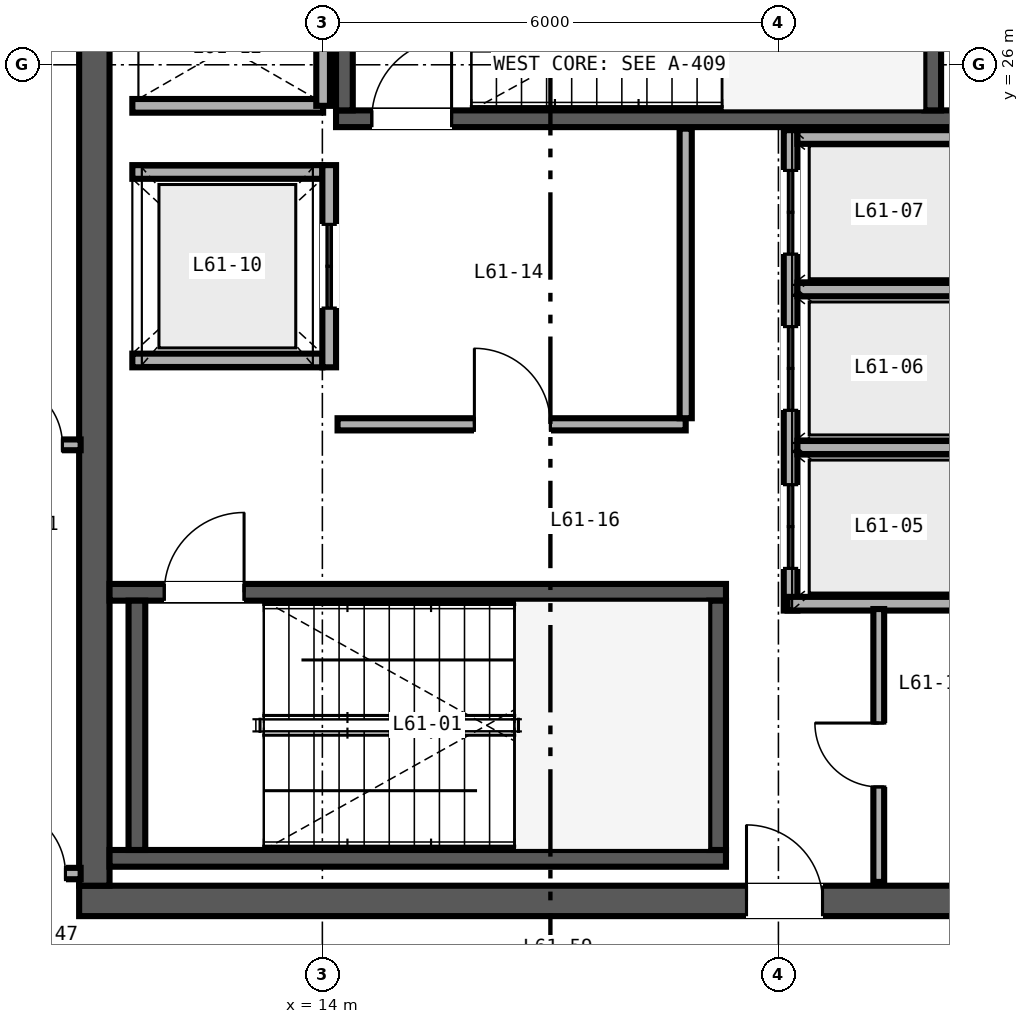
"""IFC4 building model, lengths in metres.
Left out: names, types, materials, properties, quantities, classifications, styles, units other than length and angle.
Written with IfcOpenShell. Run it as: python <this file> out.ifc"""

import sys

from ifc_helpers import new_model, si_unit, direction, frame, frame_2d, origin, place, context, subcontext, project, spatial, rectangle, extrude, source, transform, mapped, element, fill, save


model = new_model("IFC4")
c1 = context("Model", 3, precision=1e-05, world=origin(), true_north=direction((0.0, 1.0)))
c2 = subcontext(c1, "Body", "Model", "MODEL_VIEW")
j1 = project(units=[si_unit("LENGTHUNIT", "METRE"), si_unit("PLANEANGLEUNIT", "RADIAN")], contexts=[c1])
p1 = place(None, origin())
s1 = spatial("IfcSite", under=j1, at=p1, CompositionType="ELEMENT")
p2 = place(p1, origin())
s2 = spatial("IfcBuilding", under=s1, at=p2, CompositionType="ELEMENT")
p3 = place(p2, frame((0.0, 0.0, 243.6)))
s3 = spatial("IfcBuildingStorey", under=s2, at=p3, CompositionType="ELEMENT", Elevation=243.6)
p4 = place(p3, frame((10.8, 15.0, 0.0), z_axis=(0.0, 0.0, 1.0), x_axis=(1.0, 0.0, 0.0)))
e1 = element("IfcWall", 1, at=p4, inside=s3, PredefinedType="SHEAR", context=c2, shape_type="SweptSolid", body=[
    extrude(rectangle(XDim=12.4, YDim=0.4, at=frame_2d((6.2, 0.0))), origin(), (0.0, 0.0, 1.0), 3.28),
])
p5 = place(p4, frame((8.78, 0.0, 0.0)))
e2 = element("IfcOpeningElement", 2, at=p5, cuts=e1, PredefinedType="OPENING", context=c2, shape_type="SweptSolid", body=[
    extrude(rectangle(XDim=1.0, YDim=2.15, at=frame_2d((0.5, 1.075))), frame((0.0, 0.21, 0.0), z_axis=(0.0, -1.0, 0.0), x_axis=(1.0, 0.0, 0.0)), (0.0, 0.0, 1.0), 0.42),
])
p6 = place(p3, frame((11.0, 15.2, 0.0), z_axis=(0.0, 0.0, 1.0), x_axis=(0.0, 1.0, 0.0)))
e3 = element("IfcWall", 3, at=p6, inside=s3, PredefinedType="SHEAR", context=c2, shape_type="SweptSolid", body=[
    extrude(rectangle(XDim=21.6, YDim=0.4, at=frame_2d((10.8, 0.0))), origin(), (0.0, 0.0, 1.0), 3.28),
])
p7 = place(p3, frame((11.2, 15.56, 0.0), z_axis=(0.0, 0.0, 1.0), x_axis=(1.0, 0.0, 0.0)))
e4 = element("IfcWall", 4, at=p7, inside=s3, PredefinedType="SHEAR", context=c2, shape_type="SweptSolid", body=[
    extrude(rectangle(XDim=8.11, YDim=0.22, at=frame_2d((4.055, 0.0))), origin(), (0.0, 0.0, 1.0), 3.4),
])
p8 = place(p3, frame((11.2, 19.06, 0.0), z_axis=(0.0, 0.0, 1.0), x_axis=(1.0, 0.0, 0.0)))
e5 = element("IfcWall", 5, at=p8, inside=s3, PredefinedType="SHEAR", context=c2, shape_type="SweptSolid", body=[
    extrude(rectangle(XDim=8.11, YDim=0.22, at=frame_2d((4.055, 0.0))), origin(), (0.0, 0.0, 1.0), 3.4),
])
p9 = place(p8, frame((0.72, 0.0, 0.0)))
e6 = element("IfcOpeningElement", 6, at=p9, cuts=e5, PredefinedType="OPENING", context=c2, shape_type="SweptSolid", body=[
    extrude(rectangle(XDim=1.05, YDim=2.15, at=frame_2d((0.525, 1.075))), frame((0.0, 0.12, 0.0), z_axis=(0.0, -1.0, 0.0), x_axis=(1.0, 0.0, 0.0)), (0.0, 0.0, 1.0), 0.24),
])
for number, where, z_axis, x_axis in (
    (7, (11.56, 15.67, 0.0), (0.0, 0.0, 1.0), (0.0, 1.0, 0.0)),
    (8, (19.2, 15.67, 0.0), (0.0, 0.0, 1.0), (0.0, 1.0, 0.0)),
):
    element("IfcWall", number, at=place(p3, frame(where, z_axis=z_axis, x_axis=x_axis)), inside=s3, PredefinedType="SHEAR", context=c2, shape_type="SweptSolid", body=[
        extrude(rectangle(XDim=3.28, YDim=0.22, at=frame_2d((1.64, 0.0))), origin(), (0.0, 0.0, 1.0), 3.4),
    ])
p10 = place(p3, frame((14.18, 25.29, 0.0), z_axis=(0.0, 0.0, 1.0), x_axis=(1.0, 0.0, 0.0)))
e9 = element("IfcWall", 9, at=p10, inside=s3, PredefinedType="SHEAR", context=c2, shape_type="SweptSolid", body=[
    extrude(rectangle(XDim=8.62, YDim=0.22, at=frame_2d((4.31, 0.0))), origin(), (0.0, 0.0, 1.0), 3.4),
])
p11 = place(p10, frame((0.47, 0.0, 0.0)))
e10 = element("IfcOpeningElement", 10, at=p11, cuts=e9, PredefinedType="OPENING", context=c2, shape_type="SweptSolid", body=[
    extrude(rectangle(XDim=1.05, YDim=2.15, at=frame_2d((0.525, 1.075))), frame((0.0, 0.12, 0.0), z_axis=(0.0, -1.0, 0.0), x_axis=(1.0, 0.0, 0.0)), (0.0, 0.0, 1.0), 0.24),
])
for number, where, z_axis, x_axis in (
    (11, (14.29, 25.4, 0.0), (0.0, 0.0, 1.0), (0.0, 1.0, 0.0)),
    (12, (22.03, 25.4, 0.0), (0.0, 0.0, 1.0), (0.0, 1.0, 0.0)),
):
    element("IfcWall", number, at=place(p3, frame(where, z_axis=z_axis, x_axis=x_axis)), inside=s3, PredefinedType="SHEAR", context=c2, shape_type="SweptSolid", body=[
        extrude(rectangle(XDim=3.28, YDim=0.22, at=frame_2d((1.64, 0.0))), origin(), (0.0, 0.0, 1.0), 3.4),
    ])
p12 = place(p3, frame((20.16, 18.82, 0.0), z_axis=(0.0, 0.0, 1.0), x_axis=(0.0, 1.0, 0.0)))
e13 = element("IfcWall", 13, at=p12, inside=s3, PredefinedType="SOLIDWALL", context=c2, shape_type="SweptSolid", body=[
    extrude(rectangle(XDim=6.32, YDim=0.18, at=frame_2d((3.16, 0.0))), origin(), (0.0, 0.0, 1.0), 2.38),
])
p13 = place(p12, frame((0.555, 0.0, 0.0)))
e14 = element("IfcOpeningElement", 14, at=p13, cuts=e13, PredefinedType="OPENING", context=c2, shape_type="SweptSolid", body=[
    extrude(rectangle(XDim=1.1, YDim=2.2, at=frame_2d((0.55, 1.1))), frame((0.0, 0.1, 0.0), z_axis=(0.0, -1.0, 0.0), x_axis=(1.0, 0.0, 0.0)), (0.0, 0.0, 1.0), 0.2),
])
p14 = place(p12, frame((2.635, 0.0, 0.0)))
e15 = element("IfcOpeningElement", 15, at=p14, cuts=e13, PredefinedType="OPENING", context=c2, shape_type="SweptSolid", body=[
    extrude(rectangle(XDim=1.1, YDim=2.2, at=frame_2d((0.55, 1.1))), frame((0.0, 0.1, 0.0), z_axis=(0.0, -1.0, 0.0), x_axis=(1.0, 0.0, 0.0)), (0.0, 0.0, 1.0), 0.2),
])
p15 = place(p12, frame((4.69, 0.0, 0.0)))
e16 = element("IfcOpeningElement", 16, at=p15, cuts=e13, PredefinedType="OPENING", context=c2, shape_type="SweptSolid", body=[
    extrude(rectangle(XDim=1.1, YDim=2.2, at=frame_2d((0.55, 1.1))), frame((0.0, 0.1, 0.0), z_axis=(0.0, -1.0, 0.0), x_axis=(1.0, 0.0, 0.0)), (0.0, 0.0, 1.0), 0.2),
])
p16 = place(p3, frame((20.12, 18.91, 0.0), z_axis=(0.0, 0.0, 1.0), x_axis=(1.0, 0.0, 0.0)))
e17 = element("IfcWall", 17, at=p16, inside=s3, PredefinedType="SOLIDWALL", context=c2, shape_type="SweptSolid", body=[
    extrude(rectangle(XDim=2.63, YDim=0.18, at=frame_2d((1.315, 0.0))), origin(), (0.0, 0.0, 1.0), 3.28),
])
p17 = place(p3, frame((20.25, 25.05, 0.0), z_axis=(0.0, 0.0, 1.0), x_axis=(1.0, 0.0, 0.0)))
e18 = element("IfcWall", 18, at=p17, inside=s3, PredefinedType="SOLIDWALL", context=c2, shape_type="SweptSolid", body=[
    extrude(rectangle(XDim=2.36, YDim=0.18, at=frame_2d((1.18, 0.0))), origin(), (0.0, 0.0, 1.0), 3.28),
])
p18 = place(p3, frame((20.25, 20.965, 0.0), z_axis=(0.0, 0.0, 1.0), x_axis=(1.0, 0.0, 0.0)))
e19 = element("IfcWall", 19, at=p18, inside=s3, PredefinedType="SOLIDWALL", context=c2, shape_type="SweptSolid", body=[
    extrude(rectangle(XDim=2.36, YDim=0.18, at=frame_2d((1.18, 0.0))), origin(), (0.0, 0.0, 1.0), 2.38),
])
p19 = place(p3, frame((20.25, 23.045, 0.0), z_axis=(0.0, 0.0, 1.0), x_axis=(1.0, 0.0, 0.0)))
e20 = element("IfcWall", 20, at=p19, inside=s3, PredefinedType="SOLIDWALL", context=c2, shape_type="SweptSolid", body=[
    extrude(rectangle(XDim=2.36, YDim=0.18, at=frame_2d((1.18, 0.0))), origin(), (0.0, 0.0, 1.0), 3.28),
])
for number, where, z_axis, x_axis in (
    (21, (11.5, 22.11, 0.0), (0.0, 0.0, 1.0), (1.0, 0.0, 0.0)),
    (22, (11.5, 24.59, 0.0), (0.0, 0.0, 1.0), (1.0, 0.0, 0.0)),
):
    element("IfcWall", number, at=place(p3, frame(where, z_axis=z_axis, x_axis=x_axis)), inside=s3, PredefinedType="SOLIDWALL", context=c2, shape_type="SweptSolid", body=[
        extrude(rectangle(XDim=2.5, YDim=0.18, at=frame_2d((1.25, 0.0))), origin(), (0.0, 0.0, 1.0), 3.28),
    ])
p20 = place(p3, frame((14.09, 22.02, 0.0), z_axis=(0.0, 0.0, 1.0), x_axis=(0.0, 1.0, 0.0)))
e23 = element("IfcWall", 23, at=p20, inside=s3, PredefinedType="SOLIDWALL", context=c2, shape_type="SweptSolid", body=[
    extrude(rectangle(XDim=2.66, YDim=0.18, at=frame_2d((1.33, 0.0))), origin(), (0.0, 0.0, 1.0), 3.28),
])
p21 = place(p20, frame((0.78, 0.0, 0.0)))
e24 = element("IfcOpeningElement", 24, at=p21, cuts=e23, PredefinedType="OPENING", context=c2, shape_type="SweptSolid", body=[
    extrude(rectangle(XDim=1.1, YDim=2.2, at=frame_2d((0.55, 1.1))), frame((0.0, 0.1, 0.0), z_axis=(0.0, -1.0, 0.0), x_axis=(1.0, 0.0, 0.0)), (0.0, 0.0, 1.0), 0.2),
])
p22 = place(p3, frame((11.5, 25.46, 0.0), z_axis=(0.0, 0.0, 1.0), x_axis=(1.0, 0.0, 0.0)))
e25 = element("IfcWall", 25, at=p22, inside=s3, PredefinedType="SOLIDWALL", context=c2, shape_type="SweptSolid", body=[
    extrude(rectangle(XDim=2.51, YDim=0.18, at=frame_2d((1.255, 0.0))), origin(), (0.0, 0.0, 1.0), 3.28),
])
p23 = place(p3, frame((14.01, 25.46, 0.0), z_axis=(0.0, 0.0, 1.0), x_axis=(0.0, 1.0, 0.0)))
e26 = element("IfcWall", 26, at=p23, inside=s3, PredefinedType="SOLIDWALL", context=c2, shape_type="SweptSolid", body=[
    extrude(rectangle(XDim=3.08, YDim=0.18, at=frame_2d((1.54, 0.0))), origin(), (0.0, 0.0, 1.0), 3.28),
])
p24 = place(p3, frame((14.2, 21.27, 0.0), z_axis=(0.0, 0.0, 1.0), x_axis=(1.0, 0.0, 0.0)))
e27 = element("IfcWall", 27, at=p24, inside=s3, PredefinedType="PARTITIONING", context=c2, shape_type="SweptSolid", body=[
    extrude(rectangle(XDim=4.58, YDim=0.16, at=frame_2d((2.29, 0.0))), origin(), (0.0, 0.0, 1.0), 3.28),
])
p25 = place(p24, frame((1.8, 0.0, 0.0)))
e28 = element("IfcOpeningElement", 28, at=p25, cuts=e27, PredefinedType="OPENING", context=c2, shape_type="SweptSolid", body=[
    extrude(rectangle(XDim=1.0, YDim=2.15, at=frame_2d((0.5, 1.075))), frame((0.0, 0.09, 0.0), z_axis=(0.0, -1.0, 0.0), x_axis=(1.0, 0.0, 0.0)), (0.0, 0.0, 1.0), 0.18),
])
p26 = place(p3, frame((18.78, 21.35, 0.0), z_axis=(0.0, 0.0, 1.0), x_axis=(0.0, 1.0, 0.0)))
e29 = element("IfcWall", 29, at=p26, inside=s3, PredefinedType="PARTITIONING", context=c2, shape_type="SweptSolid", body=[
    extrude(rectangle(XDim=3.81, YDim=0.16, at=frame_2d((1.905, 0.0))), origin(), (0.0, 0.0, 1.0), 3.28),
])
p27 = place(p3, frame((21.32, 15.25, 0.0), z_axis=(0.0, 0.0, 1.0), x_axis=(0.0, 1.0, 0.0)))
e30 = element("IfcWall", 30, at=p27, inside=s3, PredefinedType="PARTITIONING", context=c2, shape_type="SweptSolid", body=[
    extrude(rectangle(XDim=3.59, YDim=0.142, at=frame_2d((1.795, 0.0))), origin(), (0.0, 0.0, 1.0), 3.28),
])
p28 = place(p27, frame((1.25, 0.0, 0.0)))
e31 = element("IfcOpeningElement", 31, at=p28, cuts=e30, PredefinedType="OPENING", context=c2, shape_type="SweptSolid", body=[
    extrude(rectangle(XDim=0.84, YDim=2.1, at=frame_2d((0.42, 1.05))), frame((0.0, 0.081, 0.0), z_axis=(0.0, -1.0, 0.0), x_axis=(1.0, 0.0, 0.0)), (0.0, 0.0, 1.0), 0.162),
])
p29 = place(p3, frame((8.16, 15.36, 0.0), z_axis=(0.0, 0.0, 1.0), x_axis=(1.0, 0.0, 0.0)))
e32 = element("IfcWall", 32, at=p29, inside=s3, PredefinedType="PARTITIONING", context=c2, shape_type="SweptSolid", body=[
    extrude(rectangle(XDim=2.66, YDim=0.15, at=frame_2d((1.33, 0.0))), origin(), (0.0, 0.0, 1.0), 2.501),
])
p30 = place(p29, frame((1.58, 0.0, 0.0)))
e33 = element("IfcOpeningElement", 33, at=p30, cuts=e32, PredefinedType="OPENING", context=c2, shape_type="SweptSolid", body=[
    extrude(rectangle(XDim=0.88, YDim=2.15, at=frame_2d((0.44, 1.075))), frame((0.0, 0.085, 0.0), z_axis=(0.0, -1.0, 0.0), x_axis=(1.0, 0.0, 0.0)), (0.0, 0.0, 1.0), 0.17),
])
p31 = place(p3, frame((8.16, 21.0, 0.0), z_axis=(0.0, 0.0, 1.0), x_axis=(1.0, 0.0, 0.0)))
e34 = element("IfcWall", 34, at=p31, inside=s3, PredefinedType="PARTITIONING", context=c2, shape_type="SweptSolid", body=[
    extrude(rectangle(XDim=2.66, YDim=0.142, at=frame_2d((1.33, 0.0))), origin(), (0.0, 0.0, 1.0), 2.38),
])
p32 = place(p31, frame((1.58, 0.0, 0.0)))
e35 = element("IfcOpeningElement", 35, at=p32, cuts=e34, PredefinedType="OPENING", context=c2, shape_type="SweptSolid", body=[
    extrude(rectangle(XDim=0.84, YDim=2.1, at=frame_2d((0.42, 1.05))), frame((0.0, 0.081, 0.0), z_axis=(0.0, -1.0, 0.0), x_axis=(1.0, 0.0, 0.0)), (0.0, 0.0, 1.0), 0.162),
])
m1 = source(origin(), c2, "Body", "SweptSolid", [
    extrude(rectangle(XDim=1.05, YDim=2.15, at=frame_2d((0.525, 1.075))), frame((0.0, 0.025, 0.0), z_axis=(0.0, -1.0, 0.0), x_axis=(1.0, 0.0, 0.0)), (0.0, 0.0, 1.0), 0.05),
])
p33 = place(p9, origin())
e36 = element("IfcDoor", 36, at=p33, inside=s3, OperationType="SINGLE_SWING_RIGHT", PredefinedType="DOOR", context=c2, shape_type="MappedRepresentation", body=[
    mapped(m1, transform((0.0, 0.0, 0.0), scale=1.0)),
])
fill(e6, e36)
p34 = place(p11, origin())
e37 = element("IfcDoor", 37, at=p34, inside=s3, OperationType="SINGLE_SWING_RIGHT", PredefinedType="DOOR", context=c2, shape_type="MappedRepresentation", body=[
    mapped(m1, transform((0.0, 0.0, 0.0), scale=1.0)),
])
fill(e10, e37)
m2 = source(origin(), c2, "Body", "SweptSolid", [
    extrude(rectangle(XDim=1.1, YDim=2.2, at=frame_2d((0.55, 1.1))), frame((0.0, 0.025, 0.0), z_axis=(0.0, -1.0, 0.0), x_axis=(1.0, 0.0, 0.0)), (0.0, 0.0, 1.0), 0.05),
])
p35 = place(p13, origin())
e38 = element("IfcDoor", 38, at=p35, inside=s3, OperationType="DOUBLE_DOOR_SLIDING", PredefinedType="DOOR", context=c2, shape_type="MappedRepresentation", body=[
    mapped(m2, transform((0.0, 0.0, 0.0), scale=1.0)),
])
fill(e14, e38)
p36 = place(p14, origin())
e39 = element("IfcDoor", 39, at=p36, inside=s3, OperationType="DOUBLE_DOOR_SLIDING", PredefinedType="DOOR", context=c2, shape_type="MappedRepresentation", body=[
    mapped(m2, transform((0.0, 0.0, 0.0), scale=1.0)),
])
fill(e15, e39)
p37 = place(p15, origin())
e40 = element("IfcDoor", 40, at=p37, inside=s3, OperationType="DOUBLE_DOOR_SLIDING", PredefinedType="DOOR", context=c2, shape_type="MappedRepresentation", body=[
    mapped(m2, transform((0.0, 0.0, 0.0), scale=1.0)),
])
fill(e16, e40)
p38 = place(p21, origin())
e41 = element("IfcDoor", 41, at=p38, inside=s3, OperationType="DOUBLE_DOOR_SLIDING", PredefinedType="DOOR", context=c2, shape_type="MappedRepresentation", body=[
    mapped(m2, transform((0.0, 0.0, 0.0), scale=1.0)),
])
fill(e24, e41)
m3 = source(origin(), c2, "Body", "SweptSolid", [
    extrude(rectangle(XDim=1.0, YDim=2.15, at=frame_2d((0.5, 1.075))), frame((0.0, 0.025, 0.0), z_axis=(0.0, -1.0, 0.0), x_axis=(1.0, 0.0, 0.0)), (0.0, 0.0, 1.0), 0.05),
])
p39 = place(p25, origin())
e42 = element("IfcDoor", 42, at=p39, inside=s3, OperationType="SINGLE_SWING_LEFT", PredefinedType="DOOR", context=c2, shape_type="MappedRepresentation", body=[
    mapped(m3, transform((0.0, 0.0, 0.0), scale=1.0)),
])
fill(e28, e42)
m4 = source(origin(), c2, "Body", "SweptSolid", [
    extrude(rectangle(XDim=0.84, YDim=2.1, at=frame_2d((0.42, 1.05))), frame((0.0, 0.025, 0.0), z_axis=(0.0, -1.0, 0.0), x_axis=(1.0, 0.0, 0.0)), (0.0, 0.0, 1.0), 0.05),
])
p40 = place(p28, origin())
e43 = element("IfcDoor", 43, at=p40, inside=s3, OperationType="SINGLE_SWING_RIGHT", PredefinedType="DOOR", context=c2, shape_type="MappedRepresentation", body=[
    mapped(m4, transform((0.0, 0.0, 0.0), scale=1.0)),
])
fill(e31, e43)
p41 = place(p5, origin())
e44 = element("IfcDoor", 44, at=p41, inside=s3, OperationType="SINGLE_SWING_LEFT", PredefinedType="DOOR", context=c2, shape_type="MappedRepresentation", body=[
    mapped(m3, transform((0.0, 0.0, 0.0), scale=1.0)),
])
fill(e2, e44)
m5 = source(origin(), c2, "Body", "SweptSolid", [
    extrude(rectangle(XDim=0.88, YDim=2.15, at=frame_2d((0.44, 1.075))), frame((0.0, 0.025, 0.0), z_axis=(0.0, -1.0, 0.0), x_axis=(1.0, 0.0, 0.0)), (0.0, 0.0, 1.0), 0.05),
])
p42 = place(p30, origin())
e45 = element("IfcDoor", 45, at=p42, inside=s3, OperationType="SINGLE_SWING_LEFT", PredefinedType="DOOR", context=c2, shape_type="MappedRepresentation", body=[
    mapped(m5, transform((0.0, 0.0, 0.0), scale=1.0)),
])
fill(e33, e45)
p43 = place(p32, origin())
e46 = element("IfcDoor", 46, at=p43, inside=s3, OperationType="SINGLE_SWING_LEFT", PredefinedType="DOOR", context=c2, shape_type="MappedRepresentation", body=[
    mapped(m4, transform((0.0, 0.0, 0.0), scale=1.0)),
])
fill(e35, e46)
save(model, sys.argv[1])
